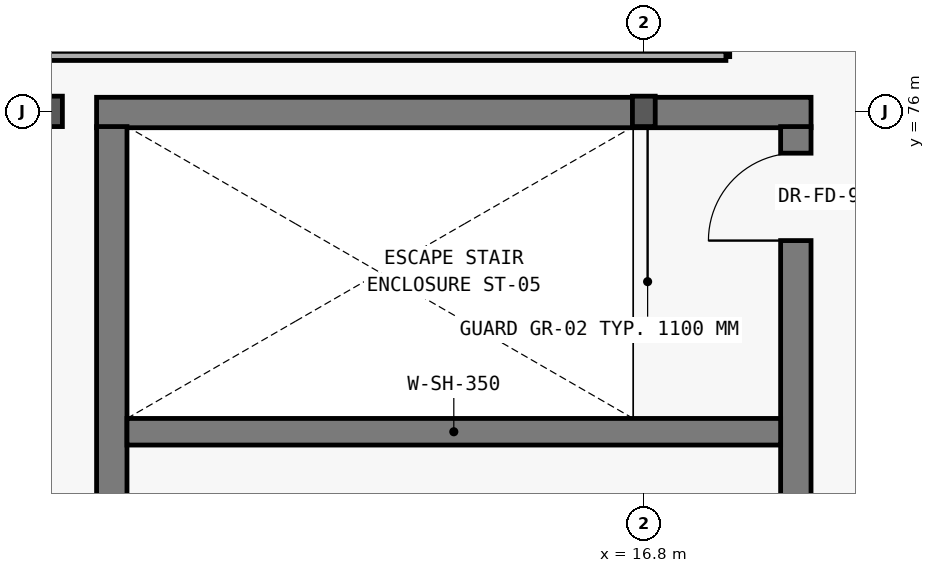
"""IFC4 building model, lengths in metres.
Left out: names, types, materials, properties, quantities, classifications, styles, units other than length and angle.
Written with IfcOpenShell. Run it as: python <this file> out.ifc"""

import sys

from ifc_helpers import new_model, si_unit, direction, frame, frame_2d, origin, origin_2d, place, context, subcontext, project, spatial, rectangle, i_section, extrude, element, fill, save


model = new_model("IFC4")
c1 = context("Model", 3, precision=1e-05, world=origin(), true_north=direction((0.0, 1.0)))
c2 = subcontext(c1, "Body", "Model", "MODEL_VIEW")
j1 = project(units=[si_unit("LENGTHUNIT", "METRE"), si_unit("PLANEANGLEUNIT", "RADIAN")], contexts=[c1])
p1 = place(None, origin())
s1 = spatial("IfcSite", under=j1, at=p1, CompositionType="ELEMENT")
p2 = place(p1, origin())
s2 = spatial("IfcBuilding", under=s1, at=p2, CompositionType="ELEMENT")
p3 = place(p2, frame((0.0, 0.0, 15.0)))
s3 = spatial("IfcBuildingStorey", under=s2, at=p3, CompositionType="ELEMENT", Elevation=15.0)
for number, where, z_axis, x_axis in (
    (1, (9.0, 76.0, 0.0), (0.0, 0.0, 1.0), (1.0, 0.0, 0.0)),
    (2, (16.8, 76.0, 0.0), (0.0, 0.0, 1.0), (1.0, 0.0, 0.0)),
):
    element("IfcColumn", number, at=place(p3, frame(where, z_axis=z_axis, x_axis=x_axis)), inside=s3, PredefinedType="COLUMN", context=c2, shape_type="SweptSolid", body=[
        extrude(i_section(OverallWidth=0.3, OverallDepth=0.4, WebThickness=0.013, FlangeThickness=0.024, at=origin_2d()), origin(), (0.0, 0.0, 1.0), 4.2),
    ])
p4 = place(p3, frame((19.0, 75.985, 0.0), z_axis=(0.0, 0.0, 1.0), x_axis=(-1.0, 0.0, 0.0)))
e3 = element("IfcWall", 3, at=p4, inside=s3, PredefinedType="SHEAR", context=c2, shape_type="SweptSolid", body=[
    extrude(rectangle(XDim=9.4, YDim=0.4, at=frame_2d((4.7, 0.0))), origin(), (0.0, 0.0, 1.0), 3.92),
])
p5 = place(p3, frame((9.8, 75.8, 0.0), z_axis=(0.0, 0.0, 1.0), x_axis=(0.0, -1.0, 0.0)))
e4 = element("IfcWall", 4, at=p5, inside=s3, PredefinedType="SHEAR", context=c2, shape_type="SweptSolid", body=[
    extrude(rectangle(XDim=7.0, YDim=0.4, at=frame_2d((3.5, 0.0))), origin(), (0.0, 0.0, 1.0), 3.92),
])
p6 = place(p3, frame((18.8, 68.8, 0.0), z_axis=(0.0, 0.0, 1.0), x_axis=(0.0, 1.0, 0.0)))
e5 = element("IfcWall", 5, at=p6, inside=s3, PredefinedType="SHEAR", context=c2, shape_type="SweptSolid", body=[
    extrude(rectangle(XDim=7.0, YDim=0.4, at=frame_2d((3.5, 0.0))), origin(), (0.0, 0.0, 1.0), 3.92),
])
p7 = place(p6, frame((5.5, 0.0, 0.0)))
e6 = element("IfcOpeningElement", 6, at=p7, cuts=e5, PredefinedType="OPENING", context=c2, shape_type="SweptSolid", body=[
    extrude(rectangle(XDim=1.15, YDim=2.2, at=frame_2d((0.575, 1.1))), frame((0.0, 0.21, 0.0), z_axis=(0.0, -1.0, 0.0), x_axis=(1.0, 0.0, 0.0)), (0.0, 0.0, 1.0), 0.42),
])
p8 = place(p3, frame((10.0, 71.785, 0.0), z_axis=(0.0, 0.0, 1.0), x_axis=(1.0, 0.0, 0.0)))
e7 = element("IfcWall", 7, at=p8, inside=s3, PredefinedType="SHEAR", context=c2, shape_type="SweptSolid", body=[
    extrude(rectangle(XDim=8.6, YDim=0.35, at=frame_2d((4.3, 0.0))), origin(), (0.0, 0.0, 1.0), 3.92),
])
p9 = place(p3, frame((17.87, 76.72, 0.0), z_axis=(0.0, 0.0, 1.0), x_axis=(0.0, 1.0, 0.0)))
e8 = element("IfcWall", 8, at=p9, inside=s3, PredefinedType="PARTITIONING", context=c2, shape_type="SweptSolid", body=[
    extrude(rectangle(XDim=4.96, YDim=0.12, at=frame_2d((2.48, 0.0))), origin(), (0.0, 0.0, 1.0), 3.02),
])
p10 = place(p9, frame((3.006, 0.0, 0.0)))
e9 = element("IfcOpeningElement", 9, at=p10, cuts=e8, PredefinedType="OPENING", context=c2, shape_type="SweptSolid", body=[
    extrude(rectangle(XDim=0.92, YDim=2.15, at=frame_2d((0.46, 1.075))), frame((0.0, 0.07, 0.0), z_axis=(0.0, -1.0, 0.0), x_axis=(1.0, 0.0, 0.0)), (0.0, 0.0, 1.0), 0.14),
])
p11 = place(p3, frame((8.64, 76.73, 0.0), z_axis=(0.0, 0.0, 1.0), x_axis=(1.0, 0.0, 0.0)))
e10 = element("IfcWall", 10, at=p11, inside=s3, PredefinedType="PARTITIONING", context=c2, shape_type="SweptSolid", body=[
    extrude(rectangle(XDim=9.24, YDim=0.12, at=frame_2d((4.62, 0.0))), origin(), (0.0, 0.0, 1.0), 3.02),
])
p12 = place(p7, origin())
e11 = element("IfcDoor", 11, at=p12, inside=s3, OperationType="SINGLE_SWING_LEFT", PredefinedType="DOOR", context=c2, shape_type="SweptSolid", body=[
    extrude(rectangle(XDim=1.15, YDim=2.2, at=frame_2d((0.575, 1.1))), frame((0.0, 0.025, 0.0), z_axis=(0.0, -1.0, 0.0), x_axis=(1.0, 0.0, 0.0)), (0.0, 0.0, 1.0), 0.05),
])
fill(e6, e11)
save(model, sys.argv[1])
